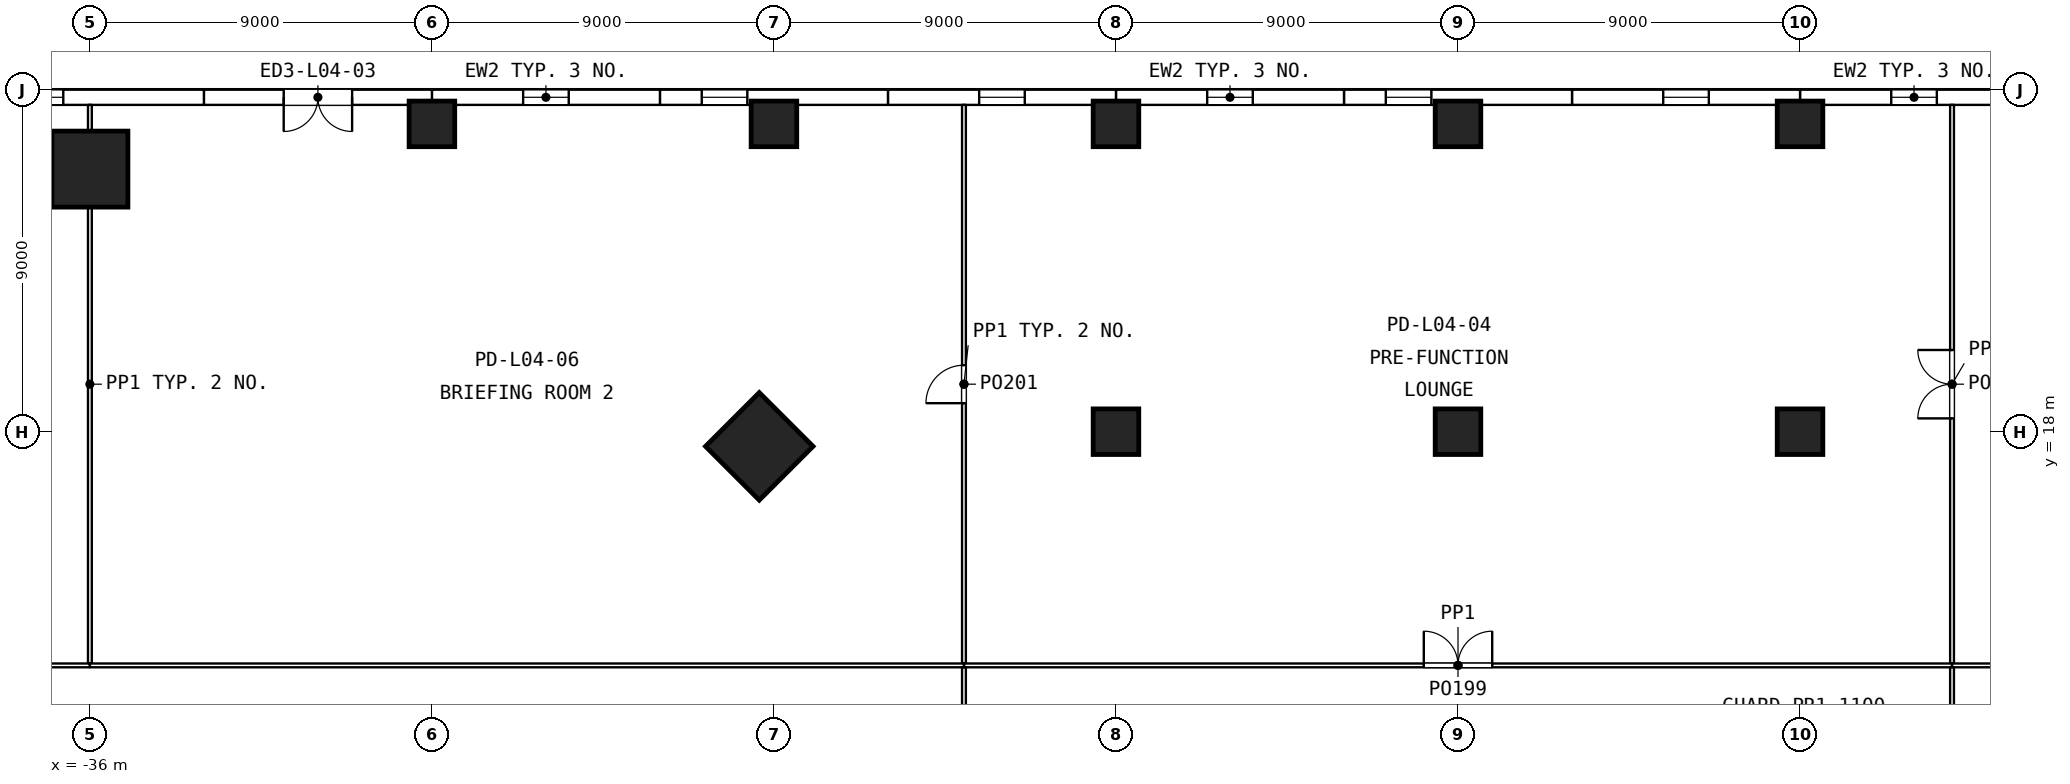
"""IFC4 building model, lengths in metres.
Left out: names, types, materials, properties, quantities, classifications, styles, units other than length and angle.
Written with IfcOpenShell. Run it as: python <this file> out.ifc"""

import sys

from ifc_helpers import new_model, si_unit, direction, frame, frame_2d, origin, origin_2d, place, context, subcontext, project, spatial, rectangle, extrude, element, fill, save


model = new_model("IFC4")
c1 = context("Model", 3, precision=1e-05, world=origin(), true_north=direction((0.0, 1.0)))
c2 = subcontext(c1, "Body", "Model", "MODEL_VIEW")
j1 = project(units=[si_unit("LENGTHUNIT", "METRE"), si_unit("PLANEANGLEUNIT", "RADIAN")], contexts=[c1])
p1 = place(None, origin())
s1 = spatial("IfcSite", under=j1, at=p1, CompositionType="ELEMENT")
p2 = place(p1, origin())
s2 = spatial("IfcBuilding", under=s1, at=p2, CompositionType="ELEMENT")
p3 = place(p2, frame((0.0, 0.0, 22.8)))
s3 = spatial("IfcBuildingStorey", under=s2, at=p3, CompositionType="ELEMENT", Elevation=22.8)
for number, where, z_axis, x_axis in (
    (1, (-27.0, 26.1, 0.0), (0.0, 0.0, 1.0), (1.0, 0.0, 0.0)),
    (2, (-18.0, 26.1, 0.0), (0.0, 0.0, 1.0), (1.0, 0.0, 0.0)),
    (3, (-9.0, 18.0, 0.0), (0.0, 0.0, 1.0), (1.0, 0.0, 0.0)),
    (4, (-9.0, 26.1, 0.0), (0.0, 0.0, 1.0), (1.0, 0.0, 0.0)),
    (5, (0.0, 18.0, 0.0), (0.0, 0.0, 1.0), (1.0, 0.0, 0.0)),
    (6, (0.0, 26.1, 0.0), (0.0, 0.0, 1.0), (1.0, 0.0, 0.0)),
    (7, (9.0, 18.0, 0.0), (0.0, 0.0, 1.0), (1.0, 0.0, 0.0)),
    (8, (9.0, 26.1, 0.0), (0.0, 0.0, 1.0), (1.0, 0.0, 0.0)),
):
    element("IfcColumn", number, at=place(p3, frame(where, z_axis=z_axis, x_axis=x_axis)), inside=s3, PredefinedType="COLUMN", context=c2, shape_type="SweptSolid", body=[
        extrude(rectangle(XDim=1.2, YDim=1.2, at=origin_2d()), origin(), (0.0, 0.0, 1.0), 4.8),
    ])
for number, where, z_axis, x_axis in (
    (9, (-18.386, 17.614, 0.0), (0.0, 0.0, 1.0), (0.707, 0.707, 0.0)),
    (10, (-36.0, 24.91, 0.0), (0.0, 0.0, 1.0), (0.0, 1.0, 0.0)),
):
    element("IfcColumn", number, at=place(p3, frame(where, z_axis=z_axis, x_axis=x_axis)), inside=s3, PredefinedType="COLUMN", context=c2, shape_type="SweptSolid", body=[
        extrude(rectangle(XDim=2.0, YDim=2.0, at=origin_2d()), origin(), (0.0, 0.0, 1.0), 4.8),
    ])
p4 = place(p3, frame((15.0, 26.8, 0.0), z_axis=(0.0, 0.0, 1.0), x_axis=(-1.0, 0.0, 0.0)))
e11 = element("IfcWall", 11, at=p4, inside=s3, PredefinedType="SOLIDWALL", context=c2, shape_type="SweptSolid", body=[
    extrude(rectangle(XDim=6.0, YDim=0.4, at=frame_2d((3.0, 0.0))), origin(), (0.0, 0.0, 1.0), 4.5),
])
p5 = place(p4, frame((2.4, 0.0, 1.1)))
e12 = element("IfcOpeningElement", 12, at=p5, cuts=e11, PredefinedType="OPENING", context=c2, shape_type="SweptSolid", body=[
    extrude(rectangle(XDim=1.2, YDim=1.8, at=frame_2d((0.6, 0.9))), frame((0.0, 0.21, 0.0), z_axis=(0.0, -1.0, 0.0), x_axis=(1.0, 0.0, 0.0)), (0.0, 0.0, 1.0), 0.42),
])
p6 = place(p3, frame((9.0, 26.8, 0.0), z_axis=(0.0, 0.0, 1.0), x_axis=(-1.0, 0.0, 0.0)))
e13 = element("IfcWall", 13, at=p6, inside=s3, PredefinedType="SOLIDWALL", context=c2, shape_type="SweptSolid", body=[
    extrude(rectangle(XDim=6.0, YDim=0.4, at=frame_2d((3.0, 0.0))), origin(), (0.0, 0.0, 1.0), 4.5),
])
p7 = place(p6, frame((2.4, 0.0, 1.1)))
e14 = element("IfcOpeningElement", 14, at=p7, cuts=e13, PredefinedType="OPENING", context=c2, shape_type="SweptSolid", body=[
    extrude(rectangle(XDim=1.2, YDim=1.8, at=frame_2d((0.6, 0.9))), frame((0.0, 0.21, 0.0), z_axis=(0.0, -1.0, 0.0), x_axis=(1.0, 0.0, 0.0)), (0.0, 0.0, 1.0), 0.42),
])
p8 = place(p3, frame((3.0, 26.8, 0.0), z_axis=(0.0, 0.0, 1.0), x_axis=(-1.0, 0.0, 0.0)))
e15 = element("IfcWall", 15, at=p8, inside=s3, PredefinedType="SOLIDWALL", context=c2, shape_type="SweptSolid", body=[
    extrude(rectangle(XDim=6.0, YDim=0.4, at=frame_2d((3.0, 0.0))), origin(), (0.0, 0.0, 1.0), 4.5),
])
p9 = place(p8, frame((3.7, 0.0, 1.1)))
e16 = element("IfcOpeningElement", 16, at=p9, cuts=e15, PredefinedType="OPENING", context=c2, shape_type="SweptSolid", body=[
    extrude(rectangle(XDim=1.2, YDim=1.8, at=frame_2d((0.6, 0.9))), frame((0.0, 0.21, 0.0), z_axis=(0.0, -1.0, 0.0), x_axis=(1.0, 0.0, 0.0)), (0.0, 0.0, 1.0), 0.42),
])
p10 = place(p3, frame((-3.0, 26.8, 0.0), z_axis=(0.0, 0.0, 1.0), x_axis=(-1.0, 0.0, 0.0)))
e17 = element("IfcWall", 17, at=p10, inside=s3, PredefinedType="SOLIDWALL", context=c2, shape_type="SweptSolid", body=[
    extrude(rectangle(XDim=6.0, YDim=0.4, at=frame_2d((3.0, 0.0))), origin(), (0.0, 0.0, 1.0), 4.5),
])
p11 = place(p10, frame((2.4, 0.0, 1.1)))
e18 = element("IfcOpeningElement", 18, at=p11, cuts=e17, PredefinedType="OPENING", context=c2, shape_type="SweptSolid", body=[
    extrude(rectangle(XDim=1.2, YDim=1.8, at=frame_2d((0.6, 0.9))), frame((0.0, 0.21, 0.0), z_axis=(0.0, -1.0, 0.0), x_axis=(1.0, 0.0, 0.0)), (0.0, 0.0, 1.0), 0.42),
])
p12 = place(p3, frame((-9.0, 26.8, 0.0), z_axis=(0.0, 0.0, 1.0), x_axis=(-1.0, 0.0, 0.0)))
e19 = element("IfcWall", 19, at=p12, inside=s3, PredefinedType="SOLIDWALL", context=c2, shape_type="SweptSolid", body=[
    extrude(rectangle(XDim=6.0, YDim=0.4, at=frame_2d((3.0, 0.0))), origin(), (0.0, 0.0, 1.0), 4.5),
])
p13 = place(p12, frame((2.4, 0.0, 1.1)))
e20 = element("IfcOpeningElement", 20, at=p13, cuts=e19, PredefinedType="OPENING", context=c2, shape_type="SweptSolid", body=[
    extrude(rectangle(XDim=1.2, YDim=1.8, at=frame_2d((0.6, 0.9))), frame((0.0, 0.21, 0.0), z_axis=(0.0, -1.0, 0.0), x_axis=(1.0, 0.0, 0.0)), (0.0, 0.0, 1.0), 0.42),
])
p14 = place(p3, frame((-15.0, 26.8, 0.0), z_axis=(0.0, 0.0, 1.0), x_axis=(-1.0, 0.0, 0.0)))
e21 = element("IfcWall", 21, at=p14, inside=s3, PredefinedType="SOLIDWALL", context=c2, shape_type="SweptSolid", body=[
    extrude(rectangle(XDim=6.0, YDim=0.4, at=frame_2d((3.0, 0.0))), origin(), (0.0, 0.0, 1.0), 4.5),
])
p15 = place(p14, frame((3.7, 0.0, 1.1)))
e22 = element("IfcOpeningElement", 22, at=p15, cuts=e21, PredefinedType="OPENING", context=c2, shape_type="SweptSolid", body=[
    extrude(rectangle(XDim=1.2, YDim=1.8, at=frame_2d((0.6, 0.9))), frame((0.0, 0.21, 0.0), z_axis=(0.0, -1.0, 0.0), x_axis=(1.0, 0.0, 0.0)), (0.0, 0.0, 1.0), 0.42),
])
p16 = place(p3, frame((-21.0, 26.8, 0.0), z_axis=(0.0, 0.0, 1.0), x_axis=(-1.0, 0.0, 0.0)))
e23 = element("IfcWall", 23, at=p16, inside=s3, PredefinedType="SOLIDWALL", context=c2, shape_type="SweptSolid", body=[
    extrude(rectangle(XDim=6.0, YDim=0.4, at=frame_2d((3.0, 0.0))), origin(), (0.0, 0.0, 1.0), 4.5),
])
p17 = place(p16, frame((2.4, 0.0, 1.1)))
e24 = element("IfcOpeningElement", 24, at=p17, cuts=e23, PredefinedType="OPENING", context=c2, shape_type="SweptSolid", body=[
    extrude(rectangle(XDim=1.2, YDim=1.8, at=frame_2d((0.6, 0.9))), frame((0.0, 0.21, 0.0), z_axis=(0.0, -1.0, 0.0), x_axis=(1.0, 0.0, 0.0)), (0.0, 0.0, 1.0), 0.42),
])
p18 = place(p3, frame((-27.0, 26.8, 0.0), z_axis=(0.0, 0.0, 1.0), x_axis=(-1.0, 0.0, 0.0)))
e25 = element("IfcWall", 25, at=p18, inside=s3, PredefinedType="SOLIDWALL", context=c2, shape_type="SweptSolid", body=[
    extrude(rectangle(XDim=6.0, YDim=0.4, at=frame_2d((3.0, 0.0))), origin(), (0.0, 0.0, 1.0), 4.5),
])
p19 = place(p18, frame((2.1, 0.0, 0.0)))
e26 = element("IfcOpeningElement", 26, at=p19, cuts=e25, PredefinedType="OPENING", context=c2, shape_type="SweptSolid", body=[
    extrude(rectangle(XDim=1.8, YDim=2.4, at=frame_2d((0.9, 1.2))), frame((0.0, 0.21, 0.0), z_axis=(0.0, -1.0, 0.0), x_axis=(1.0, 0.0, 0.0)), (0.0, 0.0, 1.0), 0.42),
])
p20 = place(p3, frame((-33.0, 26.8, 0.0), z_axis=(0.0, 0.0, 1.0), x_axis=(-1.0, 0.0, 0.0)))
e27 = element("IfcWall", 27, at=p20, inside=s3, PredefinedType="SOLIDWALL", context=c2, shape_type="SweptSolid", body=[
    extrude(rectangle(XDim=6.0, YDim=0.4, at=frame_2d((3.0, 0.0))), origin(), (0.0, 0.0, 1.0), 4.5),
])
p21 = place(p20, frame((3.7, 0.0, 1.1)))
e28 = element("IfcOpeningElement", 28, at=p21, cuts=e27, PredefinedType="OPENING", context=c2, shape_type="SweptSolid", body=[
    extrude(rectangle(XDim=1.2, YDim=1.8, at=frame_2d((0.6, 0.9))), frame((0.0, 0.21, 0.0), z_axis=(0.0, -1.0, 0.0), x_axis=(1.0, 0.0, 0.0)), (0.0, 0.0, 1.0), 0.42),
])
p22 = place(p3, frame((-13.0, 11.9, 0.0), z_axis=(0.0, 0.0, 1.0), x_axis=(0.0, 1.0, 0.0)))
e29 = element("IfcWall", 29, at=p22, inside=s3, PredefinedType="PARTITIONING", context=c2, shape_type="SweptSolid", body=[
    extrude(rectangle(XDim=14.7, YDim=0.1, at=frame_2d((7.35, 0.0))), origin(), (0.0, 0.0, 1.0), 4.5),
])
p23 = place(p22, frame((6.85, 0.0, 0.0)))
e30 = element("IfcOpeningElement", 30, at=p23, cuts=e29, PredefinedType="OPENING", context=c2, shape_type="SweptSolid", body=[
    extrude(rectangle(XDim=1.0, YDim=2.1, at=frame_2d((0.5, 1.05))), frame((0.0, 0.06, 0.0), z_axis=(0.0, -1.0, 0.0), x_axis=(1.0, 0.0, 0.0)), (0.0, 0.0, 1.0), 0.12),
])
p24 = place(p3, frame((13.0, 11.9, 0.0), z_axis=(0.0, 0.0, 1.0), x_axis=(0.0, 1.0, 0.0)))
e31 = element("IfcWall", 31, at=p24, inside=s3, PredefinedType="PARTITIONING", context=c2, shape_type="SweptSolid", body=[
    extrude(rectangle(XDim=14.7, YDim=0.1, at=frame_2d((7.35, 0.0))), origin(), (0.0, 0.0, 1.0), 4.5),
])
p25 = place(p24, frame((6.45, 0.0, 0.0)))
e32 = element("IfcOpeningElement", 32, at=p25, cuts=e31, PredefinedType="OPENING", context=c2, shape_type="SweptSolid", body=[
    extrude(rectangle(XDim=1.8, YDim=2.1, at=frame_2d((0.9, 1.05))), frame((0.0, 0.06, 0.0), z_axis=(0.0, -1.0, 0.0), x_axis=(1.0, 0.0, 0.0)), (0.0, 0.0, 1.0), 0.12),
])
p26 = place(p3, frame((-13.0, 11.85, 0.0), z_axis=(0.0, 0.0, 1.0), x_axis=(1.0, 0.0, 0.0)))
e33 = element("IfcWall", 33, at=p26, inside=s3, PredefinedType="PARTITIONING", context=c2, shape_type="SweptSolid", body=[
    extrude(rectangle(XDim=26.0, YDim=0.1, at=frame_2d((13.0, 0.0))), origin(), (0.0, 0.0, 1.0), 4.5),
])
p27 = place(p26, frame((12.1, 0.0, 0.0)))
e34 = element("IfcOpeningElement", 34, at=p27, cuts=e33, PredefinedType="OPENING", context=c2, shape_type="SweptSolid", body=[
    extrude(rectangle(XDim=1.8, YDim=2.1, at=frame_2d((0.9, 1.05))), frame((0.0, 0.06, 0.0), z_axis=(0.0, -1.0, 0.0), x_axis=(1.0, 0.0, 0.0)), (0.0, 0.0, 1.0), 0.12),
])
p28 = place(p3, frame((-36.0, 11.9, 0.0), z_axis=(0.0, 0.0, 1.0), x_axis=(0.0, 1.0, 0.0)))
e35 = element("IfcWall", 35, at=p28, inside=s3, PredefinedType="PARTITIONING", context=c2, shape_type="SweptSolid", body=[
    extrude(rectangle(XDim=14.7, YDim=0.1, at=frame_2d((7.35, 0.0))), origin(), (0.0, 0.0, 1.0), 3.71),
])
p29 = place(p3, frame((-56.2, 11.85, 0.0), z_axis=(0.0, 0.0, 1.0), x_axis=(1.0, 0.0, 0.0)))
e36 = element("IfcWall", 36, at=p29, inside=s3, PredefinedType="PARTITIONING", context=c2, shape_type="SweptSolid", body=[
    extrude(rectangle(XDim=20.2, YDim=0.1, at=frame_2d((10.1, 0.0))), origin(), (0.0, 0.0, 1.0), 4.5),
])
p30 = place(p29, frame((9.6, 0.0, 0.0)))
e37 = element("IfcOpeningElement", 37, at=p30, cuts=e36, PredefinedType="OPENING", context=c2, shape_type="SweptSolid", body=[
    extrude(rectangle(XDim=1.0, YDim=2.1, at=frame_2d((0.5, 1.05))), frame((0.0, 0.06, 0.0), z_axis=(0.0, -1.0, 0.0), x_axis=(1.0, 0.0, 0.0)), (0.0, 0.0, 1.0), 0.12),
])
p31 = place(p3, frame((-36.0, 11.85, 0.0), z_axis=(0.0, 0.0, 1.0), x_axis=(1.0, 0.0, 0.0)))
e38 = element("IfcWall", 38, at=p31, inside=s3, PredefinedType="PARTITIONING", context=c2, shape_type="SweptSolid", body=[
    extrude(rectangle(XDim=23.0, YDim=0.1, at=frame_2d((11.5, 0.0))), origin(), (0.0, 0.0, 1.0), 4.5),
])
p32 = place(p3, frame((13.0, 11.85, 0.0), z_axis=(0.0, 0.0, 1.0), x_axis=(1.0, 0.0, 0.0)))
e39 = element("IfcWall", 39, at=p32, inside=s3, PredefinedType="PARTITIONING", context=c2, shape_type="SweptSolid", body=[
    extrude(rectangle(XDim=21.415, YDim=0.1, at=frame_2d((10.708, 0.0))), origin(), (0.0, 0.0, 1.0), 4.5),
])
p33 = place(p3, frame((-13.0, -11.8, 0.0), z_axis=(0.0, 0.0, 1.0), x_axis=(0.0, 1.0, 0.0)))
e40 = element("IfcWall", 40, at=p33, inside=s3, PredefinedType="PARTITIONING", context=c2, shape_type="SweptSolid", body=[
    extrude(rectangle(XDim=23.6, YDim=0.1, at=frame_2d((11.8, 0.0))), origin(), (0.0, 0.0, 1.0), 4.5),
])
p34 = place(p33, frame((13.55, 0.0, 0.0)))
e41 = element("IfcOpeningElement", 41, at=p34, cuts=e40, PredefinedType="OPENING", context=c2, shape_type="SweptSolid", body=[
    extrude(rectangle(XDim=1.8, YDim=2.1, at=frame_2d((0.9, 1.05))), frame((0.0, 0.06, 0.0), z_axis=(0.0, -1.0, 0.0), x_axis=(1.0, 0.0, 0.0)), (0.0, 0.0, 1.0), 0.12),
])
p35 = place(p3, frame((13.0, -11.8, 0.0), z_axis=(0.0, 0.0, 1.0), x_axis=(0.0, 1.0, 0.0)))
e42 = element("IfcWall", 42, at=p35, inside=s3, PredefinedType="PARTITIONING", context=c2, shape_type="SweptSolid", body=[
    extrude(rectangle(XDim=23.6, YDim=0.1, at=frame_2d((11.8, 0.0))), origin(), (0.0, 0.0, 1.0), 4.5),
])
p36 = place(p35, frame((13.55, 0.0, 0.0)))
e43 = element("IfcOpeningElement", 43, at=p36, cuts=e42, PredefinedType="OPENING", context=c2, shape_type="SweptSolid", body=[
    extrude(rectangle(XDim=1.8, YDim=2.1, at=frame_2d((0.9, 1.05))), frame((0.0, 0.06, 0.0), z_axis=(0.0, -1.0, 0.0), x_axis=(1.0, 0.0, 0.0)), (0.0, 0.0, 1.0), 0.12),
])
p37 = place(p5, origin())
e44 = element("IfcWindow", 44, at=p37, inside=s3, PartitioningType="SINGLE_PANEL", PredefinedType="WINDOW", context=c2, shape_type="SweptSolid", body=[
    extrude(rectangle(XDim=1.2, YDim=1.8, at=frame_2d((0.6, 0.9))), frame((0.0, 0.03, 0.0), z_axis=(0.0, -1.0, 0.0), x_axis=(1.0, 0.0, 0.0)), (0.0, 0.0, 1.0), 0.06),
])
fill(e12, e44)
p38 = place(p7, origin())
e45 = element("IfcWindow", 45, at=p38, inside=s3, PartitioningType="SINGLE_PANEL", PredefinedType="WINDOW", context=c2, shape_type="SweptSolid", body=[
    extrude(rectangle(XDim=1.2, YDim=1.8, at=frame_2d((0.6, 0.9))), frame((0.0, 0.03, 0.0), z_axis=(0.0, -1.0, 0.0), x_axis=(1.0, 0.0, 0.0)), (0.0, 0.0, 1.0), 0.06),
])
fill(e14, e45)
p39 = place(p9, origin())
e46 = element("IfcWindow", 46, at=p39, inside=s3, PartitioningType="SINGLE_PANEL", PredefinedType="WINDOW", context=c2, shape_type="SweptSolid", body=[
    extrude(rectangle(XDim=1.2, YDim=1.8, at=frame_2d((0.6, 0.9))), frame((0.0, 0.03, 0.0), z_axis=(0.0, -1.0, 0.0), x_axis=(1.0, 0.0, 0.0)), (0.0, 0.0, 1.0), 0.06),
])
fill(e16, e46)
p40 = place(p11, origin())
e47 = element("IfcWindow", 47, at=p40, inside=s3, PartitioningType="SINGLE_PANEL", PredefinedType="WINDOW", context=c2, shape_type="SweptSolid", body=[
    extrude(rectangle(XDim=1.2, YDim=1.8, at=frame_2d((0.6, 0.9))), frame((0.0, 0.03, 0.0), z_axis=(0.0, -1.0, 0.0), x_axis=(1.0, 0.0, 0.0)), (0.0, 0.0, 1.0), 0.06),
])
fill(e18, e47)
p41 = place(p13, origin())
e48 = element("IfcWindow", 48, at=p41, inside=s3, PartitioningType="SINGLE_PANEL", PredefinedType="WINDOW", context=c2, shape_type="SweptSolid", body=[
    extrude(rectangle(XDim=1.2, YDim=1.8, at=frame_2d((0.6, 0.9))), frame((0.0, 0.03, 0.0), z_axis=(0.0, -1.0, 0.0), x_axis=(1.0, 0.0, 0.0)), (0.0, 0.0, 1.0), 0.06),
])
fill(e20, e48)
p42 = place(p15, origin())
e49 = element("IfcWindow", 49, at=p42, inside=s3, PartitioningType="SINGLE_PANEL", PredefinedType="WINDOW", context=c2, shape_type="SweptSolid", body=[
    extrude(rectangle(XDim=1.2, YDim=1.8, at=frame_2d((0.6, 0.9))), frame((0.0, 0.03, 0.0), z_axis=(0.0, -1.0, 0.0), x_axis=(1.0, 0.0, 0.0)), (0.0, 0.0, 1.0), 0.06),
])
fill(e22, e49)
p43 = place(p17, origin())
e50 = element("IfcWindow", 50, at=p43, inside=s3, PartitioningType="SINGLE_PANEL", PredefinedType="WINDOW", context=c2, shape_type="SweptSolid", body=[
    extrude(rectangle(XDim=1.2, YDim=1.8, at=frame_2d((0.6, 0.9))), frame((0.0, 0.03, 0.0), z_axis=(0.0, -1.0, 0.0), x_axis=(1.0, 0.0, 0.0)), (0.0, 0.0, 1.0), 0.06),
])
fill(e24, e50)
p44 = place(p19, origin())
e51 = element("IfcDoor", 51, at=p44, inside=s3, OperationType="SINGLE_SWING_LEFT", PredefinedType="DOOR", context=c2, shape_type="SweptSolid", body=[
    extrude(rectangle(XDim=1.8, YDim=2.4, at=frame_2d((0.9, 1.2))), frame((0.0, 0.025, 0.0), z_axis=(0.0, -1.0, 0.0), x_axis=(1.0, 0.0, 0.0)), (0.0, 0.0, 1.0), 0.05),
])
fill(e26, e51)
p45 = place(p21, origin())
e52 = element("IfcWindow", 52, at=p45, inside=s3, PartitioningType="SINGLE_PANEL", PredefinedType="WINDOW", context=c2, shape_type="SweptSolid", body=[
    extrude(rectangle(XDim=1.2, YDim=1.8, at=frame_2d((0.6, 0.9))), frame((0.0, 0.03, 0.0), z_axis=(0.0, -1.0, 0.0), x_axis=(1.0, 0.0, 0.0)), (0.0, 0.0, 1.0), 0.06),
])
fill(e28, e52)
p46 = place(p27, origin())
e53 = element("IfcDoor", 53, at=p46, inside=s3, OperationType="DOUBLE_DOOR_DOUBLE_SWING", PredefinedType="DOOR", context=c2, shape_type="SweptSolid", body=[
    extrude(rectangle(XDim=1.8, YDim=2.1, at=frame_2d((0.9, 1.05))), frame((0.0, 0.025, 0.0), z_axis=(0.0, -1.0, 0.0), x_axis=(1.0, 0.0, 0.0)), (0.0, 0.0, 1.0), 0.05),
])
fill(e34, e53)
p47 = place(p23, origin())
e54 = element("IfcDoor", 54, at=p47, inside=s3, OperationType="SINGLE_SWING_LEFT", PredefinedType="DOOR", context=c2, shape_type="SweptSolid", body=[
    extrude(rectangle(XDim=1.0, YDim=2.1, at=frame_2d((0.5, 1.05))), frame((0.0, 0.025, 0.0), z_axis=(0.0, -1.0, 0.0), x_axis=(1.0, 0.0, 0.0)), (0.0, 0.0, 1.0), 0.05),
])
fill(e30, e54)
p48 = place(p25, origin())
e55 = element("IfcDoor", 55, at=p48, inside=s3, OperationType="DOUBLE_DOOR_DOUBLE_SWING", PredefinedType="DOOR", context=c2, shape_type="SweptSolid", body=[
    extrude(rectangle(XDim=1.8, YDim=2.1, at=frame_2d((0.9, 1.05))), frame((0.0, 0.025, 0.0), z_axis=(0.0, -1.0, 0.0), x_axis=(1.0, 0.0, 0.0)), (0.0, 0.0, 1.0), 0.05),
])
fill(e32, e55)
save(model, sys.argv[1])
